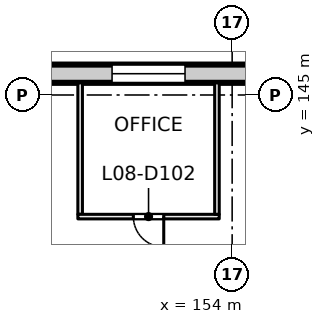
"""IFC4 building model, lengths in metres.
Left out: names, types, materials, properties, quantities, classifications, styles, units other than length and angle.
Written with IfcOpenShell. Run it as: python <this file> out.ifc"""

import sys

from ifc_helpers import new_model, si_unit, direction, frame, frame_2d, origin, place, context, subcontext, project, spatial, rectangle, extrude, element, fill, save


model = new_model("IFC4")
c1 = context("Model", 3, precision=1e-05, world=origin(), true_north=direction((0.0, 1.0)))
c2 = subcontext(c1, "Body", "Model", "MODEL_VIEW")
j1 = project(units=[si_unit("LENGTHUNIT", "METRE"), si_unit("PLANEANGLEUNIT", "RADIAN")], contexts=[c1])
p1 = place(None, origin())
s1 = spatial("IfcSite", under=j1, at=p1, CompositionType="ELEMENT")
p2 = place(p1, origin())
s2 = spatial("IfcBuilding", under=s1, at=p2, CompositionType="ELEMENT")
p3 = place(p2, frame((0.0, 0.0, 39.5)))
s3 = spatial("IfcBuildingStorey", under=s2, at=p3, CompositionType="ELEMENT", Elevation=39.5)
p4 = place(p3, frame((131.07, 145.7, 0.0), z_axis=(0.0, 0.0, 1.0), x_axis=(1.0, 0.0, 0.0)))
e1 = element("IfcWall", 1, at=p4, inside=s3, PredefinedType="SOLIDWALL", context=c2, shape_type="SweptSolid", body=[
    extrude(rectangle(XDim=31.93, YDim=0.6, at=frame_2d((15.965, 0.0))), origin(), (0.0, 0.0, 1.0), 3.625),
])
p5 = place(p4, frame((0.98, 0.0, 0.9)))
e2 = element("IfcOpeningElement", 2, at=p5, cuts=e1, PredefinedType="OPENING", context=c2, shape_type="SweptSolid", body=[
    extrude(rectangle(XDim=2.4, YDim=2.4, at=frame_2d((1.2, 1.2))), frame((0.0, 0.31, 0.0), z_axis=(0.0, -1.0, 0.0), x_axis=(1.0, 0.0, 0.0)), (0.0, 0.0, 1.0), 0.62),
])
p6 = place(p4, frame((5.48, 0.0, 0.9)))
e3 = element("IfcOpeningElement", 3, at=p6, cuts=e1, PredefinedType="OPENING", context=c2, shape_type="SweptSolid", body=[
    extrude(rectangle(XDim=2.4, YDim=2.4, at=frame_2d((1.2, 1.2))), frame((0.0, 0.31, 0.0), z_axis=(0.0, -1.0, 0.0), x_axis=(1.0, 0.0, 0.0)), (0.0, 0.0, 1.0), 0.62),
])
p7 = place(p4, frame((9.98, 0.0, 0.9)))
e4 = element("IfcOpeningElement", 4, at=p7, cuts=e1, PredefinedType="OPENING", context=c2, shape_type="SweptSolid", body=[
    extrude(rectangle(XDim=2.4, YDim=2.4, at=frame_2d((1.2, 1.2))), frame((0.0, 0.31, 0.0), z_axis=(0.0, -1.0, 0.0), x_axis=(1.0, 0.0, 0.0)), (0.0, 0.0, 1.0), 0.62),
])
p8 = place(p4, frame((14.48, 0.0, 0.9)))
e5 = element("IfcOpeningElement", 5, at=p8, cuts=e1, PredefinedType="OPENING", context=c2, shape_type="SweptSolid", body=[
    extrude(rectangle(XDim=2.4, YDim=2.4, at=frame_2d((1.2, 1.2))), frame((0.0, 0.31, 0.0), z_axis=(0.0, -1.0, 0.0), x_axis=(1.0, 0.0, 0.0)), (0.0, 0.0, 1.0), 0.62),
])
p9 = place(p4, frame((18.98, 0.0, 0.9)))
e6 = element("IfcOpeningElement", 6, at=p9, cuts=e1, PredefinedType="OPENING", context=c2, shape_type="SweptSolid", body=[
    extrude(rectangle(XDim=2.4, YDim=2.4, at=frame_2d((1.2, 1.2))), frame((0.0, 0.31, 0.0), z_axis=(0.0, -1.0, 0.0), x_axis=(1.0, 0.0, 0.0)), (0.0, 0.0, 1.0), 0.62),
])
p10 = place(p4, frame((23.48, 0.0, 0.9)))
e7 = element("IfcOpeningElement", 7, at=p10, cuts=e1, PredefinedType="OPENING", context=c2, shape_type="SweptSolid", body=[
    extrude(rectangle(XDim=2.4, YDim=2.4, at=frame_2d((1.2, 1.2))), frame((0.0, 0.31, 0.0), z_axis=(0.0, -1.0, 0.0), x_axis=(1.0, 0.0, 0.0)), (0.0, 0.0, 1.0), 0.62),
])
p11 = place(p4, frame((27.98, 0.0, 0.9)))
e8 = element("IfcOpeningElement", 8, at=p11, cuts=e1, PredefinedType="OPENING", context=c2, shape_type="SweptSolid", body=[
    extrude(rectangle(XDim=2.4, YDim=2.4, at=frame_2d((1.2, 1.2))), frame((0.0, 0.31, 0.0), z_axis=(0.0, -1.0, 0.0), x_axis=(1.0, 0.0, 0.0)), (0.0, 0.0, 1.0), 0.62),
])
p12 = place(p3, frame((149.0, 141.075, 0.0), z_axis=(0.0, 0.0, 1.0), x_axis=(0.0, 1.0, 0.0)))
e9 = element("IfcWall", 9, at=p12, inside=s3, PredefinedType="PARTITIONING", context=c2, shape_type="SweptSolid", body=[
    extrude(rectangle(XDim=4.325, YDim=0.15, at=frame_2d((2.163, 0.0))), origin(), (0.0, 0.0, 1.0), 3.625),
])
p13 = place(p3, frame((153.575, 141.0, 0.0), z_axis=(0.0, 0.0, 1.0), x_axis=(-1.0, 0.0, 0.0)))
e10 = element("IfcWall", 10, at=p13, inside=s3, PredefinedType="PARTITIONING", context=c2, shape_type="SweptSolid", body=[
    extrude(rectangle(XDim=4.65, YDim=0.15, at=frame_2d((2.325, 0.0))), origin(), (0.0, 0.0, 1.0), 3.625),
])
p14 = place(p13, frame((1.825, 0.0, 0.0)))
e11 = element("IfcOpeningElement", 11, at=p14, cuts=e10, PredefinedType="OPENING", context=c2, shape_type="SweptSolid", body=[
    extrude(rectangle(XDim=1.0, YDim=2.1, at=frame_2d((0.5, 1.05))), frame((0.0, 0.085, 0.0), z_axis=(0.0, -1.0, 0.0), x_axis=(1.0, 0.0, 0.0)), (0.0, 0.0, 1.0), 0.17),
])
p15 = place(p3, frame((153.5, 145.4, 0.0), z_axis=(0.0, 0.0, 1.0), x_axis=(0.0, -1.0, 0.0)))
e12 = element("IfcWall", 12, at=p15, inside=s3, PredefinedType="PARTITIONING", context=c2, shape_type="SweptSolid", body=[
    extrude(rectangle(XDim=4.325, YDim=0.15, at=frame_2d((2.163, 0.0))), origin(), (0.0, 0.0, 1.0), 3.625),
])
p16 = place(p9, origin())
e13 = element("IfcWindow", 13, at=p16, inside=s3, PartitioningType="SINGLE_PANEL", PredefinedType="WINDOW", context=c2, shape_type="SweptSolid", body=[
    extrude(rectangle(XDim=2.4, YDim=2.4, at=frame_2d((1.2, 1.2))), frame((0.0, 0.03, 0.0), z_axis=(0.0, -1.0, 0.0), x_axis=(1.0, 0.0, 0.0)), (0.0, 0.0, 1.0), 0.06),
])
fill(e6, e13)
p17 = place(p14, origin())
e14 = element("IfcDoor", 14, at=p17, inside=s3, OperationType="SINGLE_SWING_LEFT", PredefinedType="DOOR", context=c2, shape_type="SweptSolid", body=[
    extrude(rectangle(XDim=1.0, YDim=2.1, at=frame_2d((0.5, 1.05))), frame((0.0, 0.025, 0.0), z_axis=(0.0, -1.0, 0.0), x_axis=(1.0, 0.0, 0.0)), (0.0, 0.0, 1.0), 0.05),
])
fill(e11, e14)
save(model, sys.argv[1])
